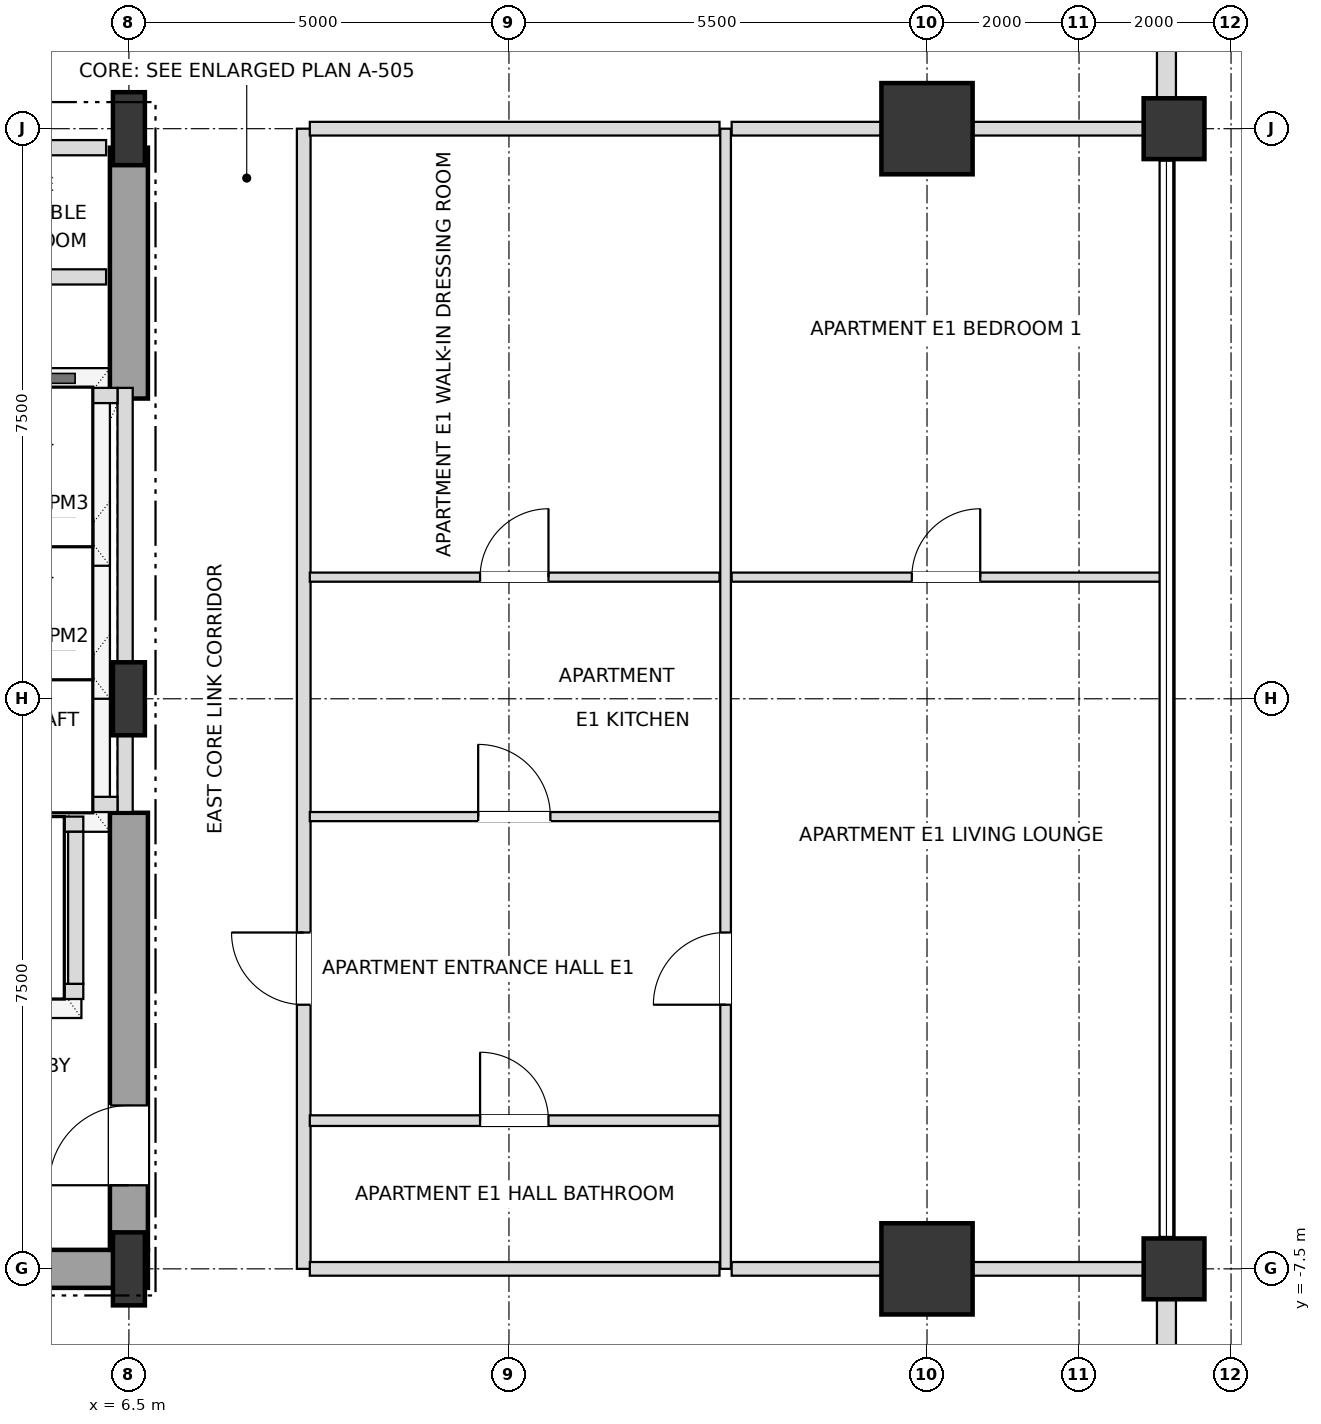
"""IFC4 building model, lengths in metres.
Left out: names, types, materials, properties, quantities, classifications, styles, units other than length and angle.
Written with IfcOpenShell. Run it as: python <this file> out.ifc"""

import sys

from ifc_helpers import new_model, si_unit, direction, frame, frame_2d, origin, origin_2d, place, context, subcontext, project, spatial, rectangle, i_section, extrude, element, fill, save


model = new_model("IFC4")
c1 = context("Model", 3, precision=1e-05, world=origin(), true_north=direction((0.0, 1.0)))
c2 = subcontext(c1, "Body", "Model", "MODEL_VIEW")
j1 = project(units=[si_unit("LENGTHUNIT", "METRE"), si_unit("PLANEANGLEUNIT", "RADIAN")], contexts=[c1])
p1 = place(None, origin())
s1 = spatial("IfcSite", under=j1, at=p1, CompositionType="ELEMENT")
p2 = place(p1, origin())
s2 = spatial("IfcBuilding", under=s1, at=p2, CompositionType="ELEMENT")
p3 = place(p2, frame((0.0, 0.0, 147.6)))
s3 = spatial("IfcBuildingStorey", under=s2, at=p3, CompositionType="ELEMENT", Elevation=147.6)
for number, where, z_axis, x_axis in (
    (1, (6.5, -7.5, 0.0), (0.0, 0.0, 1.0), (1.0, 0.0, 0.0)),
    (2, (6.5, 0.0, 0.0), (0.0, 0.0, 1.0), (1.0, 0.0, 0.0)),
    (3, (6.5, 7.5, 0.0), (0.0, 0.0, 1.0), (1.0, 0.0, 0.0)),
):
    element("IfcColumn", number, at=place(p3, frame(where, z_axis=z_axis, x_axis=x_axis)), inside=s3, PredefinedType="COLUMN", context=c2, shape_type="SweptSolid", body=[
        extrude(i_section(OverallWidth=0.42, OverallDepth=0.96, WebThickness=0.022, FlangeThickness=0.034, at=origin_2d()), origin(), (0.0, 0.0, 1.0), 3.6),
    ])
for number, where, z_axis, x_axis in (
    (4, (17.0, -7.5, 0.0), (0.0, 0.0, 1.0), (1.0, 0.0, 0.0)),
    (5, (17.0, 7.5, 0.0), (0.0, 0.0, 1.0), (1.0, 0.0, 0.0)),
):
    element("IfcColumn", number, at=place(p3, frame(where, z_axis=z_axis, x_axis=x_axis)), inside=s3, PredefinedType="USERDEFINED", context=c2, shape_type="SweptSolid", body=[
        extrude(rectangle(XDim=1.2, YDim=1.2, at=origin_2d()), origin(), (0.0, 0.0, 1.0), 3.6),
    ])
for number, where, z_axis, x_axis in (
    (6, (20.25, -7.5, 0.0), (0.0, 0.0, 1.0), (1.0, 0.0, 0.0)),
    (7, (20.25, 7.5, 0.0), (0.0, 0.0, 1.0), (1.0, 0.0, 0.0)),
):
    element("IfcColumn", number, at=place(p3, frame(where, z_axis=z_axis, x_axis=x_axis)), inside=s3, PredefinedType="COLUMN", context=c2, shape_type="SweptSolid", body=[
        extrude(rectangle(XDim=0.8, YDim=0.8, at=origin_2d()), origin(), (0.0, 0.0, 1.0), 3.6),
    ])
p4 = place(p3, frame((20.15, -12.605, 0.0), z_axis=(0.0, 0.0, 1.0), x_axis=(0.0, 1.0, 0.0)))
e8 = element("IfcWall", 8, at=p4, inside=s3, PredefinedType="SOLIDWALL", context=c2, shape_type="SweptSolid", body=[
    extrude(rectangle(XDim=4.71, YDim=0.25, at=frame_2d((2.355, 0.0))), origin(), (0.0, 0.0, 1.0), 2.736),
])
p5 = place(p4, frame((1.455, 0.0, 0.72)))
e9 = element("IfcOpeningElement", 9, at=p5, cuts=e8, PredefinedType="OPENING", context=c2, shape_type="SweptSolid", body=[
    extrude(rectangle(XDim=1.8, YDim=1.68, at=frame_2d((0.9, 0.84))), frame((0.0, 0.135, 0.0), z_axis=(0.0, -1.0, 0.0), x_axis=(1.0, 0.0, 0.0)), (0.0, 0.0, 1.0), 0.27),
])
p6 = place(p3, frame((20.15, 7.895, 0.0), z_axis=(0.0, 0.0, 1.0), x_axis=(0.0, 1.0, 0.0)))
e10 = element("IfcWall", 10, at=p6, inside=s3, PredefinedType="SOLIDWALL", context=c2, shape_type="SweptSolid", body=[
    extrude(rectangle(XDim=4.71, YDim=0.25, at=frame_2d((2.355, 0.0))), origin(), (0.0, 0.0, 1.0), 2.736),
])
p7 = place(p6, frame((1.455, 0.0, 0.72)))
e11 = element("IfcOpeningElement", 11, at=p7, cuts=e10, PredefinedType="OPENING", context=c2, shape_type="SweptSolid", body=[
    extrude(rectangle(XDim=1.8, YDim=1.68, at=frame_2d((0.9, 0.84))), frame((0.0, 0.135, 0.0), z_axis=(0.0, -1.0, 0.0), x_axis=(1.0, 0.0, 0.0)), (0.0, 0.0, 1.0), 0.27),
])
p8 = place(p3, frame((0.0, -7.5, 0.0), z_axis=(0.0, 0.0, 1.0), x_axis=(1.0, 0.0, 0.0)))
e12 = element("IfcWall", 12, at=p8, inside=s3, PredefinedType="SHEAR", context=c2, shape_type="SweptSolid", body=[
    extrude(rectangle(XDim=6.75, YDim=0.5, at=frame_2d((3.375, 0.0))), origin(), (0.0, 0.0, 1.0), 3.38),
])
p9 = place(p3, frame((6.5, -7.25, 0.0), z_axis=(0.0, 0.0, 1.0), x_axis=(0.0, 1.0, 0.0)))
e13 = element("IfcWall", 13, at=p9, inside=s3, PredefinedType="SHEAR", context=c2, shape_type="SweptSolid", body=[
    extrude(rectangle(XDim=5.75, YDim=0.5, at=frame_2d((2.875, 0.0))), origin(), (0.0, 0.0, 1.0), 3.38),
])
p10 = place(p9, frame((0.85, 0.0, 0.0)))
e14 = element("IfcOpeningElement", 14, at=p10, cuts=e13, PredefinedType="OPENING", context=c2, shape_type="SweptSolid", body=[
    extrude(rectangle(XDim=1.05, YDim=2.15, at=frame_2d((0.525, 1.075))), frame((0.0, 0.26, 0.0), z_axis=(0.0, -1.0, 0.0), x_axis=(1.0, 0.0, 0.0)), (0.0, 0.0, 1.0), 0.52),
])
p11 = place(p3, frame((6.5, 3.95, 0.0), z_axis=(0.0, 0.0, 1.0), x_axis=(0.0, 1.0, 0.0)))
e15 = element("IfcWall", 15, at=p11, inside=s3, PredefinedType="SHEAR", context=c2, shape_type="SweptSolid", body=[
    extrude(rectangle(XDim=3.3, YDim=0.5, at=frame_2d((1.65, 0.0))), origin(), (0.0, 0.0, 1.0), 3.38),
])
p12 = place(p3, frame((6.45, -1.49, 0.0), z_axis=(0.0, 0.0, 1.0), x_axis=(0.0, 1.0, 0.0)))
e16 = element("IfcWall", 16, at=p12, inside=s3, PredefinedType="SOLIDWALL", context=c2, shape_type="SweptSolid", body=[
    extrude(rectangle(XDim=5.58, YDim=0.2, at=frame_2d((2.79, 0.0))), origin(), (0.0, 0.0, 1.0), 2.816),
])
for number, where, z_axis, x_axis in (
    (17, (4.15, -1.39, 0.0), (0.0, 0.0, 1.0), (1.0, 0.0, 0.0)),
    (18, (4.15, 3.99, 0.0), (0.0, 0.0, 1.0), (1.0, 0.0, 0.0)),
):
    element("IfcWall", number, at=place(p3, frame(where, z_axis=z_axis, x_axis=x_axis)), inside=s3, PredefinedType="SOLIDWALL", context=c2, shape_type="SweptSolid", body=[
        extrude(rectangle(XDim=2.2, YDim=0.2, at=frame_2d((1.1, 0.0))), origin(), (0.0, 0.0, 1.0), 3.38),
    ])
p13 = place(p3, frame((1.8, -3.85, 0.0), z_axis=(0.0, 0.0, 1.0), x_axis=(1.0, 0.0, 0.0)))
e19 = element("IfcWall", 19, at=p13, inside=s3, PredefinedType="SOLIDWALL", context=c2, shape_type="SweptSolid", body=[
    extrude(rectangle(XDim=4.1, YDim=0.2, at=frame_2d((2.05, 0.0))), origin(), (0.0, 0.0, 1.0), 3.38),
])
p14 = place(p13, frame((0.45, 0.0, 0.0)))
e20 = element("IfcOpeningElement", 20, at=p14, cuts=e19, PredefinedType="OPENING", context=c2, shape_type="SweptSolid", body=[
    extrude(rectangle(XDim=1.2, YDim=2.2, at=frame_2d((0.6, 1.1))), frame((0.0, 0.11, 0.0), z_axis=(0.0, -1.0, 0.0), x_axis=(1.0, 0.0, 0.0)), (0.0, 0.0, 1.0), 0.22),
])
p15 = place(p13, frame((2.45, 0.0, 0.0)))
e21 = element("IfcOpeningElement", 21, at=p15, cuts=e19, PredefinedType="OPENING", context=c2, shape_type="SweptSolid", body=[
    extrude(rectangle(XDim=1.2, YDim=2.2, at=frame_2d((0.6, 1.1))), frame((0.0, 0.11, 0.0), z_axis=(0.0, -1.0, 0.0), x_axis=(1.0, 0.0, 0.0)), (0.0, 0.0, 1.0), 0.22),
])
p16 = place(p3, frame((1.8, -1.65, 0.0), z_axis=(0.0, 0.0, 1.0), x_axis=(1.0, 0.0, 0.0)))
e22 = element("IfcWall", 22, at=p16, inside=s3, PredefinedType="SOLIDWALL", context=c2, shape_type="SweptSolid", body=[
    extrude(rectangle(XDim=4.1, YDim=0.2, at=frame_2d((2.05, 0.0))), origin(), (0.0, 0.0, 1.0), 3.38),
])
p17 = place(p3, frame((5.8, -3.75, 0.0), z_axis=(0.0, 0.0, 1.0), x_axis=(0.0, 1.0, 0.0)))
e23 = element("IfcWall", 23, at=p17, inside=s3, PredefinedType="SOLIDWALL", context=c2, shape_type="SweptSolid", body=[
    extrude(rectangle(XDim=2.0, YDim=0.2, at=frame_2d((1.0, 0.0))), origin(), (0.0, 0.0, 1.0), 3.38),
])
p18 = place(p3, frame((8.8, -7.5, 0.0), z_axis=(0.0, 0.0, 1.0), x_axis=(0.0, 1.0, 0.0)))
e24 = element("IfcWall", 24, at=p18, inside=s3, PredefinedType="PARTITIONING", context=c2, shape_type="SweptSolid", body=[
    extrude(rectangle(XDim=15.0, YDim=0.18, at=frame_2d((7.5, 0.0))), origin(), (0.0, 0.0, 1.0), 3.38),
])
p19 = place(p18, frame((3.475, 0.0, 0.0)))
e25 = element("IfcOpeningElement", 25, at=p19, cuts=e24, PredefinedType="OPENING", context=c2, shape_type="SweptSolid", body=[
    extrude(rectangle(XDim=0.95, YDim=2.15, at=frame_2d((0.475, 1.075))), frame((0.0, 0.1, 0.0), z_axis=(0.0, -1.0, 0.0), x_axis=(1.0, 0.0, 0.0)), (0.0, 0.0, 1.0), 0.2),
])
p20 = place(p3, frame((14.35, -7.5, 0.0), z_axis=(0.0, 0.0, 1.0), x_axis=(0.0, 1.0, 0.0)))
e26 = element("IfcWall", 26, at=p20, inside=s3, PredefinedType="PARTITIONING", context=c2, shape_type="SweptSolid", body=[
    extrude(rectangle(XDim=15.0, YDim=0.14, at=frame_2d((7.5, 0.0))), origin(), (0.0, 0.0, 1.0), 3.38),
])
p21 = place(p20, frame((3.475, 0.0, 0.0)))
e27 = element("IfcOpeningElement", 27, at=p21, cuts=e26, PredefinedType="OPENING", context=c2, shape_type="SweptSolid", body=[
    extrude(rectangle(XDim=0.95, YDim=2.1, at=frame_2d((0.475, 1.05))), frame((0.0, 0.08, 0.0), z_axis=(0.0, -1.0, 0.0), x_axis=(1.0, 0.0, 0.0)), (0.0, 0.0, 1.0), 0.16),
])
p22 = place(p3, frame((8.88, -7.5, 0.0), z_axis=(0.0, 0.0, 1.0), x_axis=(1.0, 0.0, 0.0)))
e28 = element("IfcWall", 28, at=p22, inside=s3, PredefinedType="PARTITIONING", context=c2, shape_type="SweptSolid", body=[
    extrude(rectangle(XDim=5.39, YDim=0.18, at=frame_2d((2.695, 0.0))), origin(), (0.0, 0.0, 1.0), 2.816),
])
p23 = place(p3, frame((14.43, -7.5, 0.0), z_axis=(0.0, 0.0, 1.0), x_axis=(1.0, 0.0, 0.0)))
e29 = element("IfcWall", 29, at=p23, inside=s3, PredefinedType="PARTITIONING", context=c2, shape_type="SweptSolid", body=[
    extrude(rectangle(XDim=5.72, YDim=0.18, at=frame_2d((2.86, 0.0))), origin(), (0.0, 0.0, 1.0), 2.816),
])
p24 = place(p3, frame((8.88, -5.55, 0.0), z_axis=(0.0, 0.0, 1.0), x_axis=(1.0, 0.0, 0.0)))
e30 = element("IfcWall", 30, at=p24, inside=s3, PredefinedType="PARTITIONING", context=c2, shape_type="SweptSolid", body=[
    extrude(rectangle(XDim=5.39, YDim=0.14, at=frame_2d((2.695, 0.0))), origin(), (0.0, 0.0, 1.0), 3.38),
])
p25 = place(p24, frame((2.24, 0.0, 0.0)))
e31 = element("IfcOpeningElement", 31, at=p25, cuts=e30, PredefinedType="OPENING", context=c2, shape_type="SweptSolid", body=[
    extrude(rectangle(XDim=0.9, YDim=2.1, at=frame_2d((0.45, 1.05))), frame((0.0, 0.08, 0.0), z_axis=(0.0, -1.0, 0.0), x_axis=(1.0, 0.0, 0.0)), (0.0, 0.0, 1.0), 0.16),
])
p26 = place(p3, frame((8.88, -1.55, 0.0), z_axis=(0.0, 0.0, 1.0), x_axis=(1.0, 0.0, 0.0)))
e32 = element("IfcWall", 32, at=p26, inside=s3, PredefinedType="PARTITIONING", context=c2, shape_type="SweptSolid", body=[
    extrude(rectangle(XDim=5.39, YDim=0.12, at=frame_2d((2.695, 0.0))), origin(), (0.0, 0.0, 1.0), 3.38),
])
p27 = place(p26, frame((2.215, 0.0, 0.0)))
e33 = element("IfcOpeningElement", 33, at=p27, cuts=e32, PredefinedType="OPENING", context=c2, shape_type="SweptSolid", body=[
    extrude(rectangle(XDim=0.95, YDim=2.1, at=frame_2d((0.475, 1.05))), frame((0.0, 0.07, 0.0), z_axis=(0.0, -1.0, 0.0), x_axis=(1.0, 0.0, 0.0)), (0.0, 0.0, 1.0), 0.14),
])
p28 = place(p3, frame((8.88, 1.6, 0.0), z_axis=(0.0, 0.0, 1.0), x_axis=(1.0, 0.0, 0.0)))
e34 = element("IfcWall", 34, at=p28, inside=s3, PredefinedType="PARTITIONING", context=c2, shape_type="SweptSolid", body=[
    extrude(rectangle(XDim=5.39, YDim=0.12, at=frame_2d((2.695, 0.0))), origin(), (0.0, 0.0, 1.0), 3.38),
])
p29 = place(p28, frame((2.24, 0.0, 0.0)))
e35 = element("IfcOpeningElement", 35, at=p29, cuts=e34, PredefinedType="OPENING", context=c2, shape_type="SweptSolid", body=[
    extrude(rectangle(XDim=0.9, YDim=2.1, at=frame_2d((0.45, 1.05))), frame((0.0, 0.07, 0.0), z_axis=(0.0, -1.0, 0.0), x_axis=(1.0, 0.0, 0.0)), (0.0, 0.0, 1.0), 0.14),
])
p30 = place(p3, frame((14.43, 1.6, 0.0), z_axis=(0.0, 0.0, 1.0), x_axis=(1.0, 0.0, 0.0)))
e36 = element("IfcWall", 36, at=p30, inside=s3, PredefinedType="PARTITIONING", context=c2, shape_type="SweptSolid", body=[
    extrude(rectangle(XDim=5.64, YDim=0.12, at=frame_2d((2.82, 0.0))), origin(), (0.0, 0.0, 1.0), 2.816),
])
p31 = place(p30, frame((2.37, 0.0, 0.0)))
e37 = element("IfcOpeningElement", 37, at=p31, cuts=e36, PredefinedType="OPENING", context=c2, shape_type="SweptSolid", body=[
    extrude(rectangle(XDim=0.9, YDim=2.1, at=frame_2d((0.45, 1.05))), frame((0.0, 0.07, 0.0), z_axis=(0.0, -1.0, 0.0), x_axis=(1.0, 0.0, 0.0)), (0.0, 0.0, 1.0), 0.14),
])
for number, where, z_axis, x_axis in (
    (38, (4.13, 5.55, 0.0), (0.0, 0.0, 1.0), (1.0, 0.0, 0.0)),
    (39, (4.13, 7.25, 0.0), (0.0, 0.0, 1.0), (1.0, 0.0, 0.0)),
):
    element("IfcWall", number, at=place(p3, frame(where, z_axis=z_axis, x_axis=x_axis)), inside=s3, PredefinedType="SOLIDWALL", context=c2, shape_type="SweptSolid", body=[
        extrude(rectangle(XDim=2.07, YDim=0.2, at=frame_2d((1.035, 0.0))), origin(), (0.0, 0.0, 1.0), 3.38),
    ])
p32 = place(p3, frame((8.88, 7.5, 0.0), z_axis=(0.0, 0.0, 1.0), x_axis=(1.0, 0.0, 0.0)))
e40 = element("IfcWall", 40, at=p32, inside=s3, PredefinedType="PARTITIONING", context=c2, shape_type="SweptSolid", body=[
    extrude(rectangle(XDim=5.39, YDim=0.18, at=frame_2d((2.695, 0.0))), origin(), (0.0, 0.0, 1.0), 2.816),
])
p33 = place(p3, frame((14.43, 7.5, 0.0), z_axis=(0.0, 0.0, 1.0), x_axis=(1.0, 0.0, 0.0)))
e41 = element("IfcWall", 41, at=p33, inside=s3, PredefinedType="PARTITIONING", context=c2, shape_type="SweptSolid", body=[
    extrude(rectangle(XDim=5.72, YDim=0.18, at=frame_2d((2.86, 0.0))), origin(), (0.0, 0.0, 1.0), 2.816),
])
p34 = place(p10, origin())
e42 = element("IfcDoor", 42, at=p34, inside=s3, OperationType="SINGLE_SWING_LEFT", PredefinedType="DOOR", context=c2, shape_type="SweptSolid", body=[
    extrude(rectangle(XDim=1.05, YDim=2.15, at=frame_2d((0.525, 1.075))), frame((0.0, 0.025, 0.0), z_axis=(0.0, -1.0, 0.0), x_axis=(1.0, 0.0, 0.0)), (0.0, 0.0, 1.0), 0.05),
])
fill(e14, e42)
p35 = place(p25, origin())
e43 = element("IfcDoor", 43, at=p35, inside=s3, OperationType="SINGLE_SWING_LEFT", PredefinedType="DOOR", context=c2, shape_type="SweptSolid", body=[
    extrude(rectangle(XDim=0.9, YDim=2.1, at=frame_2d((0.45, 1.05))), frame((0.0, 0.025, 0.0), z_axis=(0.0, -1.0, 0.0), x_axis=(1.0, 0.0, 0.0)), (0.0, 0.0, 1.0), 0.05),
])
fill(e31, e43)
p36 = place(p19, origin())
e44 = element("IfcDoor", 44, at=p36, inside=s3, OperationType="SINGLE_SWING_RIGHT", PredefinedType="DOOR", context=c2, shape_type="SweptSolid", body=[
    extrude(rectangle(XDim=0.95, YDim=2.15, at=frame_2d((0.475, 1.075))), frame((0.0, 0.025, 0.0), z_axis=(0.0, -1.0, 0.0), x_axis=(1.0, 0.0, 0.0)), (0.0, 0.0, 1.0), 0.05),
])
fill(e25, e44)
p37 = place(p27, origin())
e45 = element("IfcDoor", 45, at=p37, inside=s3, OperationType="SINGLE_SWING_LEFT", PredefinedType="DOOR", context=c2, shape_type="SweptSolid", body=[
    extrude(rectangle(XDim=0.95, YDim=2.1, at=frame_2d((0.475, 1.05))), frame((0.0, 0.025, 0.0), z_axis=(0.0, -1.0, 0.0), x_axis=(1.0, 0.0, 0.0)), (0.0, 0.0, 1.0), 0.05),
])
fill(e33, e45)
p38 = place(p29, origin())
e46 = element("IfcDoor", 46, at=p38, inside=s3, OperationType="SINGLE_SWING_RIGHT", PredefinedType="DOOR", context=c2, shape_type="SweptSolid", body=[
    extrude(rectangle(XDim=0.9, YDim=2.1, at=frame_2d((0.45, 1.05))), frame((0.0, 0.025, 0.0), z_axis=(0.0, -1.0, 0.0), x_axis=(1.0, 0.0, 0.0)), (0.0, 0.0, 1.0), 0.05),
])
fill(e35, e46)
p39 = place(p21, origin())
e47 = element("IfcDoor", 47, at=p39, inside=s3, OperationType="SINGLE_SWING_LEFT", PredefinedType="DOOR", context=c2, shape_type="SweptSolid", body=[
    extrude(rectangle(XDim=0.95, YDim=2.1, at=frame_2d((0.475, 1.05))), frame((0.0, 0.025, 0.0), z_axis=(0.0, -1.0, 0.0), x_axis=(1.0, 0.0, 0.0)), (0.0, 0.0, 1.0), 0.05),
])
fill(e27, e47)
p40 = place(p31, origin())
e48 = element("IfcDoor", 48, at=p40, inside=s3, OperationType="SINGLE_SWING_RIGHT", PredefinedType="DOOR", context=c2, shape_type="SweptSolid", body=[
    extrude(rectangle(XDim=0.9, YDim=2.1, at=frame_2d((0.45, 1.05))), frame((0.0, 0.025, 0.0), z_axis=(0.0, -1.0, 0.0), x_axis=(1.0, 0.0, 0.0)), (0.0, 0.0, 1.0), 0.05),
])
fill(e37, e48)
save(model, sys.argv[1])
